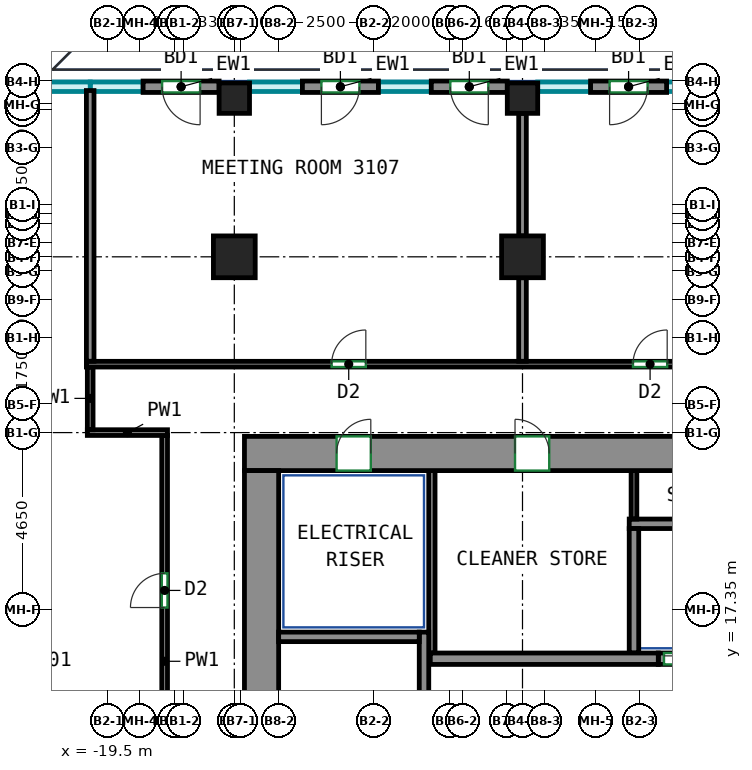
"""IFC4 building model, lengths in metres.
Left out: names, types, materials, properties, quantities, classifications, styles, units other than length and angle.
Written with IfcOpenShell. Run it as: python <this file> out.ifc"""

import sys

from ifc_helpers import new_model, si_unit, direction, frame, frame_2d, origin, origin_2d, place, context, subcontext, project, spatial, rectangle, extrude, source, transform, mapped, element, fill, save


model = new_model("IFC4")
c1 = context("Model", 3, precision=1e-05, world=origin(), true_north=direction((0.0, 1.0)))
c2 = subcontext(c1, "Body", "Model", "MODEL_VIEW")
j1 = project(units=[si_unit("LENGTHUNIT", "METRE"), si_unit("PLANEANGLEUNIT", "RADIAN")], contexts=[c1])
p1 = place(None, origin())
s1 = spatial("IfcSite", under=j1, at=p1, CompositionType="ELEMENT")
p2 = place(p1, origin())
s2 = spatial("IfcBuilding", under=s1, at=p2, CompositionType="ELEMENT")
p3 = place(p2, frame((0.0, 0.0, 138.5)))
s3 = spatial("IfcBuildingStorey", under=s2, at=p3, CompositionType="ELEMENT", Elevation=138.5)
m1 = source(origin(), c2, "Body", "SweptSolid", [
    extrude(rectangle(XDim=1.1, YDim=1.1, at=origin_2d()), origin(), (0.0, 0.0, 1.0), 5.12),
])
p4 = place(p3, frame((-16.167, 26.625, 0.0), z_axis=(0.0, 0.0, 1.0), x_axis=(1.0, 0.0, 0.0)))
e1 = element("IfcColumn", 1, at=p4, inside=s3, PredefinedType="COLUMN", context=c2, shape_type="MappedRepresentation", body=[
    mapped(m1, transform((0.0, 0.0, 0.0))),
])
m2 = source(origin(), c2, "Body", "SweptSolid", [
    extrude(rectangle(XDim=0.8, YDim=0.8, at=origin_2d()), origin(), (0.0, 0.0, 1.0), 5.12),
])
p5 = place(p3, frame((-16.167, 30.8, 0.0), z_axis=(0.0, 0.0, 1.0), x_axis=(1.0, 0.0, 0.0)))
e2 = element("IfcColumn", 2, at=p5, inside=s3, PredefinedType="COLUMN", context=c2, shape_type="MappedRepresentation", body=[
    mapped(m2, transform((0.0, 0.0, 0.0))),
])
p6 = place(p3, frame((-8.583, 26.625, 0.0), z_axis=(0.0, 0.0, 1.0), x_axis=(1.0, 0.0, 0.0)))
e3 = element("IfcColumn", 3, at=p6, inside=s3, PredefinedType="COLUMN", context=c2, shape_type="MappedRepresentation", body=[
    mapped(m1, transform((0.0, 0.0, 0.0))),
])
p7 = place(p3, frame((-8.583, 30.8, 0.0), z_axis=(0.0, 0.0, 1.0), x_axis=(1.0, 0.0, 0.0)))
e4 = element("IfcColumn", 4, at=p7, inside=s3, PredefinedType="COLUMN", context=c2, shape_type="MappedRepresentation", body=[
    mapped(m2, transform((0.0, 0.0, 0.0))),
])
m3 = source(origin(), c2, "Body", "SweptSolid", [
    extrude(rectangle(XDim=33.9, YDim=0.9, at=frame_2d((16.95, 0.0))), origin(), (0.0, 0.0, 1.0), 5.12),
])
p8 = place(p3, frame((-15.9, 21.45, 0.0), z_axis=(0.0, 0.0, 1.0), x_axis=(1.0, 0.0, 0.0)))
e5 = element("IfcWall", 5, at=p8, inside=s3, PredefinedType="SHEAR", context=c2, shape_type="MappedRepresentation", body=[
    mapped(m3, transform((0.0, 0.0, 0.0))),
])
p9 = place(p8, frame((7.12, 0.0, 0.0)))
e6 = element("IfcOpeningElement", 6, at=p9, cuts=e5, PredefinedType="OPENING", context=c2, shape_type="SweptSolid", body=[
    extrude(rectangle(XDim=0.9, YDim=2.1, at=frame_2d((0.45, 1.05))), frame((0.0, 0.46, 0.0), z_axis=(0.0, -1.0, 0.0), x_axis=(1.0, 0.0, 0.0)), (0.0, 0.0, 1.0), 0.92),
])
p10 = place(p8, frame((12.427, 0.0, 0.0)))
e7 = element("IfcOpeningElement", 7, at=p10, cuts=e5, PredefinedType="OPENING", context=c2, shape_type="SweptSolid", body=[
    extrude(rectangle(XDim=0.9, YDim=2.1, at=frame_2d((0.45, 1.05))), frame((0.0, 0.46, 0.0), z_axis=(0.0, -1.0, 0.0), x_axis=(1.0, 0.0, 0.0)), (0.0, 0.0, 1.0), 0.92),
])
p11 = place(p8, frame((17.465, 0.0, 0.0)))
e8 = element("IfcOpeningElement", 8, at=p11, cuts=e5, PredefinedType="OPENING", context=c2, shape_type="SweptSolid", body=[
    extrude(rectangle(XDim=0.9, YDim=2.1, at=frame_2d((0.45, 1.05))), frame((0.0, 0.46, 0.0), z_axis=(0.0, -1.0, 0.0), x_axis=(1.0, 0.0, 0.0)), (0.0, 0.0, 1.0), 0.92),
])
p12 = place(p8, frame((21.686, 0.0, 0.0)))
e9 = element("IfcOpeningElement", 9, at=p12, cuts=e5, PredefinedType="OPENING", context=c2, shape_type="SweptSolid", body=[
    extrude(rectangle(XDim=0.9, YDim=2.1, at=frame_2d((0.45, 1.05))), frame((0.0, 0.46, 0.0), z_axis=(0.0, -1.0, 0.0), x_axis=(1.0, 0.0, 0.0)), (0.0, 0.0, 1.0), 0.92),
])
p13 = place(p8, frame((26.027, 0.0, 0.0)))
e10 = element("IfcOpeningElement", 10, at=p13, cuts=e5, PredefinedType="OPENING", context=c2, shape_type="SweptSolid", body=[
    extrude(rectangle(XDim=0.9, YDim=2.1, at=frame_2d((0.45, 1.05))), frame((0.0, 0.46, 0.0), z_axis=(0.0, -1.0, 0.0), x_axis=(1.0, 0.0, 0.0)), (0.0, 0.0, 1.0), 0.92),
])
p14 = place(p8, frame((2.425, 0.0, 0.0)))
e11 = element("IfcOpeningElement", 11, at=p14, cuts=e5, PredefinedType="OPENING", context=c2, shape_type="SweptSolid", body=[
    extrude(rectangle(XDim=0.9, YDim=2.1, at=frame_2d((0.45, 1.05))), frame((0.0, 0.46, 0.0), z_axis=(0.0, -1.0, 0.0), x_axis=(1.0, 0.0, 0.0)), (0.0, 0.0, 1.0), 0.92),
])
p15 = place(p8, frame((30.575, 0.0, 0.0)))
e12 = element("IfcOpeningElement", 12, at=p15, cuts=e5, PredefinedType="OPENING", context=c2, shape_type="SweptSolid", body=[
    extrude(rectangle(XDim=0.9, YDim=2.1, at=frame_2d((0.45, 1.05))), frame((0.0, 0.46, 0.0), z_axis=(0.0, -1.0, 0.0), x_axis=(1.0, 0.0, 0.0)), (0.0, 0.0, 1.0), 0.92),
])
m4 = source(origin(), c2, "Body", "SweptSolid", [
    extrude(rectangle(XDim=12.0, YDim=0.9, at=frame_2d((6.0, 0.0))), origin(), (0.0, 0.0, 1.0), 5.12),
])
p16 = place(p3, frame((-15.45, 9.0, 0.0), z_axis=(0.0, 0.0, 1.0), x_axis=(0.0, 1.0, 0.0)))
e13 = element("IfcWall", 13, at=p16, inside=s3, PredefinedType="SHEAR", context=c2, shape_type="MappedRepresentation", body=[
    mapped(m4, transform((0.0, 0.0, 0.0))),
])
m5 = source(origin(), c2, "Body", "SweptSolid", [
    extrude(rectangle(XDim=7.75, YDim=0.25, at=frame_2d((3.875, 0.0))), origin(), (0.0, 0.0, 1.0), 5.12),
])
p17 = place(p3, frame((-11.175, 9.0, 0.0), z_axis=(0.0, 0.0, 1.0), x_axis=(0.0, 1.0, 0.0)))
e14 = element("IfcWall", 14, at=p17, inside=s3, PredefinedType="SHEAR", context=c2, shape_type="MappedRepresentation", body=[
    mapped(m5, transform((0.0, 0.0, 0.0))),
])
m6 = source(origin(), c2, "Body", "SweptSolid", [
    extrude(rectangle(XDim=3.7, YDim=0.25, at=frame_2d((1.85, 0.0))), origin(), (0.0, 0.0, 1.0), 5.12),
])
p18 = place(p3, frame((-15.0, 16.625, 0.0), z_axis=(0.0, 0.0, 1.0), x_axis=(1.0, 0.0, 0.0)))
e15 = element("IfcWall", 15, at=p18, inside=s3, PredefinedType="SHEAR", context=c2, shape_type="MappedRepresentation", body=[
    mapped(m6, transform((0.0, 0.0, 0.0))),
])
m7 = source(origin(), c2, "Body", "SweptSolid", [
    extrude(rectangle(XDim=6.0, YDim=0.3, at=frame_2d((3.0, 0.0))), origin(), (0.0, 0.0, 1.0), 5.12),
])
p19 = place(p3, frame((-11.01, 16.05, 0.0), z_axis=(0.0, 0.0, 1.0), x_axis=(1.0, 0.0, 0.0)))
e16 = element("IfcWall", 16, at=p19, inside=s3, PredefinedType="SHEAR", context=c2, shape_type="MappedRepresentation", body=[
    mapped(m7, transform((0.0, 0.0, 0.0))),
])
m8 = source(origin(), c2, "Body", "SweptSolid", [
    extrude(rectangle(XDim=2.0, YDim=0.3, at=frame_2d((1.0, 0.0))), origin(), (0.0, 0.0, 1.0), 5.12),
])
p20 = place(p3, frame((-4.792, 31.1, 0.0), z_axis=(0.0, 0.0, 1.0), x_axis=(-1.0, 0.0, 0.0)))
e17 = element("IfcWall", 17, at=p20, inside=s3, PredefinedType="SOLIDWALL", context=c2, shape_type="MappedRepresentation", body=[
    mapped(m8, transform((0.0, 0.0, 0.0))),
])
p21 = place(p20, frame((0.5, 0.0, 0.0)))
e18 = element("IfcOpeningElement", 18, at=p21, cuts=e17, PredefinedType="OPENING", context=c2, shape_type="SweptSolid", body=[
    extrude(rectangle(XDim=1.0, YDim=2.1, at=frame_2d((0.5, 1.05))), frame((0.0, 0.16, 0.0), z_axis=(0.0, -1.0, 0.0), x_axis=(1.0, 0.0, 0.0)), (0.0, 0.0, 1.0), 0.32),
])
p22 = place(p3, frame((-8.983, 31.1, 0.0), z_axis=(0.0, 0.0, 1.0), x_axis=(-1.0, 0.0, 0.0)))
e19 = element("IfcWall", 19, at=p22, inside=s3, PredefinedType="SOLIDWALL", context=c2, shape_type="MappedRepresentation", body=[
    mapped(m8, transform((0.0, 0.0, 0.0))),
])
p23 = place(p22, frame((0.5, 0.0, 0.0)))
e20 = element("IfcOpeningElement", 20, at=p23, cuts=e19, PredefinedType="OPENING", context=c2, shape_type="SweptSolid", body=[
    extrude(rectangle(XDim=1.0, YDim=2.1, at=frame_2d((0.5, 1.05))), frame((0.0, 0.16, 0.0), z_axis=(0.0, -1.0, 0.0), x_axis=(1.0, 0.0, 0.0)), (0.0, 0.0, 1.0), 0.32),
])
p24 = place(p3, frame((-12.375, 31.1, 0.0), z_axis=(0.0, 0.0, 1.0), x_axis=(-1.0, 0.0, 0.0)))
e21 = element("IfcWall", 21, at=p24, inside=s3, PredefinedType="SOLIDWALL", context=c2, shape_type="MappedRepresentation", body=[
    mapped(m8, transform((0.0, 0.0, 0.0))),
])
p25 = place(p24, frame((0.5, 0.0, 0.0)))
e22 = element("IfcOpeningElement", 22, at=p25, cuts=e21, PredefinedType="OPENING", context=c2, shape_type="SweptSolid", body=[
    extrude(rectangle(XDim=1.0, YDim=2.1, at=frame_2d((0.5, 1.05))), frame((0.0, 0.16, 0.0), z_axis=(0.0, -1.0, 0.0), x_axis=(1.0, 0.0, 0.0)), (0.0, 0.0, 1.0), 0.32),
])
p26 = place(p3, frame((-16.567, 31.1, 0.0), z_axis=(0.0, 0.0, 1.0), x_axis=(-1.0, 0.0, 0.0)))
e23 = element("IfcWall", 23, at=p26, inside=s3, PredefinedType="SOLIDWALL", context=c2, shape_type="MappedRepresentation", body=[
    mapped(m8, transform((0.0, 0.0, 0.0))),
])
p27 = place(p26, frame((0.5, 0.0, 0.0)))
e24 = element("IfcOpeningElement", 24, at=p27, cuts=e23, PredefinedType="OPENING", context=c2, shape_type="SweptSolid", body=[
    extrude(rectangle(XDim=1.0, YDim=2.1, at=frame_2d((0.5, 1.05))), frame((0.0, 0.16, 0.0), z_axis=(0.0, -1.0, 0.0), x_axis=(1.0, 0.0, 0.0)), (0.0, 0.0, 1.0), 0.32),
])
m9 = source(origin(), c2, "Body", "SweptSolid", [
    extrude(rectangle(XDim=1.4, YDim=0.3, at=frame_2d((0.7, 0.0))), origin(), (0.0, 0.0, 1.0), 5.12),
])
p28 = place(p3, frame((-5.01, 16.05, 0.0), z_axis=(0.0, 0.0, 1.0), x_axis=(1.0, 0.0, 0.0)))
e25 = element("IfcWall", 25, at=p28, inside=s3, PredefinedType="PARTITIONING", context=c2, shape_type="MappedRepresentation", body=[
    mapped(m9, transform((0.0, 0.0, 0.0))),
])
p29 = place(p28, frame((0.15, 0.0, 0.0)))
e26 = element("IfcOpeningElement", 26, at=p29, cuts=e25, PredefinedType="OPENING", context=c2, shape_type="SweptSolid", body=[
    extrude(rectangle(XDim=1.1, YDim=2.1, at=frame_2d((0.55, 1.05))), frame((0.0, 0.16, 0.0), z_axis=(0.0, -1.0, 0.0), x_axis=(1.0, 0.0, 0.0)), (0.0, 0.0, 1.0), 0.32),
])
m10 = source(origin(), c2, "Body", "SweptSolid", [
    extrude(rectangle(XDim=19.01, YDim=0.25, at=frame_2d((9.505, 0.0))), origin(), (0.0, 0.0, 1.0), 5.12),
])
p30 = place(p3, frame((-5.775, 19.6, 0.0), z_axis=(0.0, 0.0, 1.0), x_axis=(1.0, 0.0, 0.0)))
e27 = element("IfcWall", 27, at=p30, inside=s3, PredefinedType="PARTITIONING", context=c2, shape_type="MappedRepresentation", body=[
    mapped(m10, transform((0.0, 0.0, 0.0))),
])
m11 = source(origin(), c2, "Body", "SweptSolid", [
    extrude(rectangle(XDim=4.8, YDim=0.165, at=frame_2d((2.4, 0.0))), origin(), (0.0, 0.0, 1.0), 5.12),
])
p31 = place(p3, frame((-10.968, 16.2, 0.0), z_axis=(0.0, 0.0, 1.0), x_axis=(0.0, 1.0, 0.0)))
e28 = element("IfcWall", 28, at=p31, inside=s3, PredefinedType="PARTITIONING", context=c2, shape_type="MappedRepresentation", body=[
    mapped(m11, transform((0.0, 0.0, 0.0))),
])
m12 = source(origin(), c2, "Body", "SweptSolid", [
    extrude(rectangle(XDim=3.275, YDim=0.25, at=frame_2d((1.638, 0.0))), origin(), (0.0, 0.0, 1.0), 5.12),
])
p32 = place(p3, frame((-5.65, 16.2, 0.0), z_axis=(0.0, 0.0, 1.0), x_axis=(0.0, 1.0, 0.0)))
e29 = element("IfcWall", 29, at=p32, inside=s3, PredefinedType="PARTITIONING", context=c2, shape_type="MappedRepresentation", body=[
    mapped(m12, transform((0.0, 0.0, 0.0))),
])
m13 = source(origin(), c2, "Body", "SweptSolid", [
    extrude(rectangle(XDim=1.275, YDim=0.15, at=frame_2d((0.637, 0.0))), origin(), (0.0, 0.0, 1.0), 5.12),
])
p33 = place(p3, frame((-5.65, 19.725, 0.0), z_axis=(0.0, 0.0, 1.0), x_axis=(0.0, 1.0, 0.0)))
e30 = element("IfcWall", 30, at=p33, inside=s3, PredefinedType="PARTITIONING", context=c2, shape_type="MappedRepresentation", body=[
    mapped(m13, transform((0.0, 0.0, 0.0))),
])
p34 = place(p3, frame((-18.0, 10.04, 0.0), z_axis=(0.0, 0.0, 1.0), x_axis=(0.0, 1.0, 0.0)))
e31 = element("IfcWall", 31, at=p34, inside=s3, PredefinedType="PARTITIONING", context=c2, shape_type="SweptSolid", body=[
    extrude(rectangle(XDim=11.885, YDim=0.15, at=frame_2d((5.942, 0.0))), origin(), (0.0, 0.0, 1.0), 5.12),
])
p35 = place(p34, frame((7.357, 0.0, 0.0)))
e32 = element("IfcOpeningElement", 32, at=p35, cuts=e31, PredefinedType="OPENING", context=c2, shape_type="SweptSolid", body=[
    extrude(rectangle(XDim=0.9, YDim=2.1, at=frame_2d((0.45, 1.05))), frame((0.0, 0.085, 0.0), z_axis=(0.0, -1.0, 0.0), x_axis=(1.0, 0.0, 0.0)), (0.0, 0.0, 1.0), 0.17),
])
p36 = place(p3, frame((-20.034, 22.0, 0.0), z_axis=(0.0, 0.0, 1.0), x_axis=(1.0, 0.0, 0.0)))
e33 = element("IfcWall", 33, at=p36, inside=s3, PredefinedType="PARTITIONING", context=c2, shape_type="SweptSolid", body=[
    extrude(rectangle(XDim=2.109, YDim=0.15, at=frame_2d((1.054, 0.0))), origin(), (0.0, 0.0, 1.0), 5.12),
])
p37 = place(p3, frame((-19.959, 22.075, 0.0), z_axis=(0.0, 0.0, 1.0), x_axis=(0.0, 1.0, 0.0)))
e34 = element("IfcWall", 34, at=p37, inside=s3, PredefinedType="PARTITIONING", context=c2, shape_type="SweptSolid", body=[
    extrude(rectangle(XDim=1.65, YDim=0.15, at=frame_2d((0.825, 0.0))), origin(), (0.0, 0.0, 1.0), 5.12),
])
p38 = place(p3, frame((-20.059, 23.8, 0.0), z_axis=(0.0, 0.0, 1.0), x_axis=(1.0, 0.0, 0.0)))
e35 = element("IfcWall", 35, at=p38, inside=s3, PredefinedType="PARTITIONING", context=c2, shape_type="SweptSolid", body=[
    extrude(rectangle(XDim=41.909, YDim=0.15, at=frame_2d((20.955, 0.0))), origin(), (0.0, 0.0, 1.0), 5.12),
])
p39 = place(p38, frame((6.453, 0.0, 0.0)))
e36 = element("IfcOpeningElement", 36, at=p39, cuts=e35, PredefinedType="OPENING", context=c2, shape_type="SweptSolid", body=[
    extrude(rectangle(XDim=0.9, YDim=2.1, at=frame_2d((0.45, 1.05))), frame((0.0, 0.085, 0.0), z_axis=(0.0, -1.0, 0.0), x_axis=(1.0, 0.0, 0.0)), (0.0, 0.0, 1.0), 0.17),
])
p40 = place(p38, frame((14.383, 0.0, 0.0)))
e37 = element("IfcOpeningElement", 37, at=p40, cuts=e35, PredefinedType="OPENING", context=c2, shape_type="SweptSolid", body=[
    extrude(rectangle(XDim=0.9, YDim=2.1, at=frame_2d((0.45, 1.05))), frame((0.0, 0.085, 0.0), z_axis=(0.0, -1.0, 0.0), x_axis=(1.0, 0.0, 0.0)), (0.0, 0.0, 1.0), 0.17),
])
p41 = place(p38, frame((34.202, 0.0, 0.0)))
e38 = element("IfcOpeningElement", 38, at=p41, cuts=e35, PredefinedType="OPENING", context=c2, shape_type="SweptSolid", body=[
    extrude(rectangle(XDim=0.9, YDim=2.1, at=frame_2d((0.45, 1.05))), frame((0.0, 0.085, 0.0), z_axis=(0.0, -1.0, 0.0), x_axis=(1.0, 0.0, 0.0)), (0.0, 0.0, 1.0), 0.17),
])
p42 = place(p38, frame((40.409, 0.0, 0.0)))
e39 = element("IfcOpeningElement", 39, at=p42, cuts=e35, PredefinedType="OPENING", context=c2, shape_type="SweptSolid", body=[
    extrude(rectangle(XDim=0.9, YDim=2.1, at=frame_2d((0.45, 1.05))), frame((0.0, 0.085, 0.0), z_axis=(0.0, -1.0, 0.0), x_axis=(1.0, 0.0, 0.0)), (0.0, 0.0, 1.0), 0.17),
])
p43 = place(p3, frame((-19.959, 23.877, 0.0), z_axis=(0.0, 0.0, 1.0), x_axis=(0.0, 1.0, 0.0)))
e40 = element("IfcWall", 40, at=p43, inside=s3, PredefinedType="PARTITIONING", context=c2, shape_type="SweptSolid", body=[
    extrude(rectangle(XDim=7.123, YDim=0.2, at=frame_2d((3.562, 0.0))), origin(), (0.0, 0.0, 1.0), 5.12),
])
p44 = place(p3, frame((-8.583, 23.877, 0.0), z_axis=(0.0, 0.0, 1.0), x_axis=(0.0, 1.0, 0.0)))
e41 = element("IfcWall", 41, at=p44, inside=s3, PredefinedType="PARTITIONING", context=c2, shape_type="SweptSolid", body=[
    extrude(rectangle(XDim=2.198, YDim=0.2, at=frame_2d((1.099, 0.0))), origin(), (0.0, 0.0, 1.0), 5.12),
])
p45 = place(p3, frame((-8.583, 27.175, 0.0), z_axis=(0.0, 0.0, 1.0), x_axis=(0.0, 1.0, 0.0)))
e42 = element("IfcWall", 42, at=p45, inside=s3, PredefinedType="PARTITIONING", context=c2, shape_type="SweptSolid", body=[
    extrude(rectangle(XDim=3.225, YDim=0.2, at=frame_2d((1.612, 0.0))), origin(), (0.0, 0.0, 1.0), 5.12),
])
p46 = place(p21, origin())
e43 = element("IfcDoor", 43, at=p46, inside=s3, OperationType="SINGLE_SWING_RIGHT", PredefinedType="DOOR", context=c2, shape_type="SweptSolid", body=[
    extrude(rectangle(XDim=1.0, YDim=2.1, at=frame_2d((0.5, 1.05))), frame((0.0, 0.025, 0.0), z_axis=(0.0, -1.0, 0.0), x_axis=(1.0, 0.0, 0.0)), (0.0, 0.0, 1.0), 0.05),
])
fill(e18, e43)
p47 = place(p23, origin())
e44 = element("IfcDoor", 44, at=p47, inside=s3, OperationType="SINGLE_SWING_LEFT", PredefinedType="DOOR", context=c2, shape_type="SweptSolid", body=[
    extrude(rectangle(XDim=1.0, YDim=2.1, at=frame_2d((0.5, 1.05))), frame((0.0, 0.025, 0.0), z_axis=(0.0, -1.0, 0.0), x_axis=(1.0, 0.0, 0.0)), (0.0, 0.0, 1.0), 0.05),
])
fill(e20, e44)
p48 = place(p25, origin())
e45 = element("IfcDoor", 45, at=p48, inside=s3, OperationType="SINGLE_SWING_RIGHT", PredefinedType="DOOR", context=c2, shape_type="SweptSolid", body=[
    extrude(rectangle(XDim=1.0, YDim=2.1, at=frame_2d((0.5, 1.05))), frame((0.0, 0.025, 0.0), z_axis=(0.0, -1.0, 0.0), x_axis=(1.0, 0.0, 0.0)), (0.0, 0.0, 1.0), 0.05),
])
fill(e22, e45)
p49 = place(p27, origin())
e46 = element("IfcDoor", 46, at=p49, inside=s3, OperationType="SINGLE_SWING_LEFT", PredefinedType="DOOR", context=c2, shape_type="SweptSolid", body=[
    extrude(rectangle(XDim=1.0, YDim=2.1, at=frame_2d((0.5, 1.05))), frame((0.0, 0.025, 0.0), z_axis=(0.0, -1.0, 0.0), x_axis=(1.0, 0.0, 0.0)), (0.0, 0.0, 1.0), 0.05),
])
fill(e24, e46)
p50 = place(p29, origin())
e47 = element("IfcDoor", 47, at=p50, inside=s3, OperationType="DOUBLE_DOOR_SLIDING", PredefinedType="DOOR", context=c2, shape_type="SweptSolid", body=[
    extrude(rectangle(XDim=1.1, YDim=2.1, at=frame_2d((0.55, 1.05))), frame((0.0, 0.025, 0.0), z_axis=(0.0, -1.0, 0.0), x_axis=(1.0, 0.0, 0.0)), (0.0, 0.0, 1.0), 0.05),
])
fill(e26, e47)
p51 = place(p9, origin())
e48 = element("IfcDoor", 48, at=p51, inside=s3, OperationType="SINGLE_SWING_LEFT", PredefinedType="DOOR", context=c2, shape_type="SweptSolid", body=[
    extrude(rectangle(XDim=0.9, YDim=2.1, at=frame_2d((0.45, 1.05))), frame((0.0, -0.305, 0.0), z_axis=(0.0, -1.0, 0.0), x_axis=(1.0, 0.0, 0.0)), (0.0, 0.0, 1.0), 0.05),
])
fill(e6, e48)
p52 = place(p14, origin())
e49 = element("IfcDoor", 49, at=p52, inside=s3, OperationType="SINGLE_SWING_RIGHT", PredefinedType="DOOR", context=c2, shape_type="SweptSolid", body=[
    extrude(rectangle(XDim=0.9, YDim=2.1, at=frame_2d((0.45, 1.05))), frame((0.0, -0.305, 0.0), z_axis=(0.0, -1.0, 0.0), x_axis=(1.0, 0.0, 0.0)), (0.0, 0.0, 1.0), 0.05),
])
fill(e11, e49)
p53 = place(p35, origin())
e50 = element("IfcDoor", 50, at=p53, inside=s3, OperationType="SINGLE_SWING_LEFT", PredefinedType="DOOR", context=c2, shape_type="SweptSolid", body=[
    extrude(rectangle(XDim=0.9, YDim=2.1, at=frame_2d((0.45, 1.05))), frame((0.0, 0.025, 0.0), z_axis=(0.0, -1.0, 0.0), x_axis=(1.0, 0.0, 0.0)), (0.0, 0.0, 1.0), 0.05),
])
fill(e32, e50)
p54 = place(p39, origin())
e51 = element("IfcDoor", 51, at=p54, inside=s3, OperationType="SINGLE_SWING_RIGHT", PredefinedType="DOOR", context=c2, shape_type="SweptSolid", body=[
    extrude(rectangle(XDim=0.9, YDim=2.1, at=frame_2d((0.45, 1.05))), frame((0.0, 0.025, 0.0), z_axis=(0.0, -1.0, 0.0), x_axis=(1.0, 0.0, 0.0)), (0.0, 0.0, 1.0), 0.05),
])
fill(e36, e51)
p55 = place(p40, origin())
e52 = element("IfcDoor", 52, at=p55, inside=s3, OperationType="SINGLE_SWING_RIGHT", PredefinedType="DOOR", context=c2, shape_type="SweptSolid", body=[
    extrude(rectangle(XDim=0.9, YDim=2.1, at=frame_2d((0.45, 1.05))), frame((0.0, 0.025, 0.0), z_axis=(0.0, -1.0, 0.0), x_axis=(1.0, 0.0, 0.0)), (0.0, 0.0, 1.0), 0.05),
])
fill(e37, e52)
save(model, sys.argv[1])
